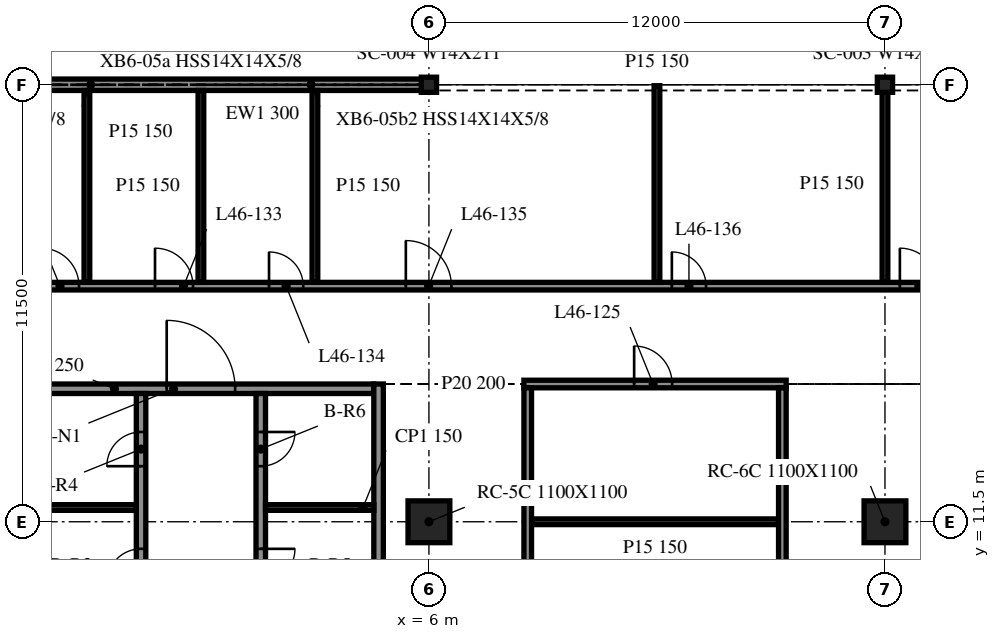
"""IFC4 building model, lengths in metres.
Left out: names, types, materials, properties, quantities, classifications, styles, units other than length and angle.
Written with IfcOpenShell. Run it as: python <this file> out.ifc"""

import sys

from ifc_helpers import new_model, si_unit, direction, frame, frame_2d, origin, origin_2d, place, context, subcontext, project, spatial, rectangle, i_section, extrude, element, fill, save


model = new_model("IFC4")
c1 = context("Model", 3, precision=1e-05, world=origin(), true_north=direction((0.0, 1.0)))
c2 = subcontext(c1, "Body", "Model", "MODEL_VIEW")
j1 = project(units=[si_unit("LENGTHUNIT", "METRE"), si_unit("PLANEANGLEUNIT", "RADIAN")], contexts=[c1])
p1 = place(None, origin())
s1 = spatial("IfcSite", under=j1, at=p1, CompositionType="ELEMENT")
p2 = place(p1, origin())
s2 = spatial("IfcBuilding", under=s1, at=p2, CompositionType="ELEMENT")
p3 = place(p2, frame((0.0, 0.0, 193.9)))
s3 = spatial("IfcBuildingStorey", under=s2, at=p3, CompositionType="ELEMENT", Elevation=193.9)
for number, where, z_axis, x_axis in (
    (1, (6.0, 11.5, -0.34), (0.0, 0.0, 1.0), (1.0, 0.0, 0.0)),
    (2, (18.0, 11.5, -0.34), (0.0, 0.0, 1.0), (1.0, 0.0, 0.0)),
):
    element("IfcColumn", number, at=place(p3, frame(where, z_axis=z_axis, x_axis=x_axis)), inside=s3, PredefinedType="COLUMN", context=c2, shape_type="SweptSolid", body=[
        extrude(rectangle(XDim=1.1, YDim=1.1, at=origin_2d()), origin(), (0.0, 0.0, 1.0), 3.8),
    ])
for number, where, z_axis, x_axis in (
    (3, (18.0, 23.0, -0.34), (0.0, 0.0, 1.0), (1.0, 0.0, 0.0)),
    (4, (6.0, 23.0, -0.34), (0.0, 0.0, 1.0), (1.0, 0.0, 0.0)),
):
    element("IfcColumn", number, at=place(p3, frame(where, z_axis=z_axis, x_axis=x_axis)), inside=s3, PredefinedType="COLUMN", context=c2, shape_type="SweptSolid", body=[
        extrude(i_section(OverallWidth=0.401, OverallDepth=0.399, WebThickness=0.025, FlangeThickness=0.04, at=origin_2d()), origin(), (0.0, 0.0, 1.0), 3.8),
    ])
p4 = place(p3, frame((5.988, 23.0, 0.0), z_axis=(0.0, 0.0, 1.0), x_axis=(-1.0, 0.0, 0.0)))
e5 = element("IfcWall", 5, at=p4, inside=s3, PredefinedType="NOTDEFINED", context=c2, shape_type="SweptSolid", body=[
    extrude(rectangle(XDim=11.975, YDim=0.3, at=frame_2d((5.988, 0.0))), origin(), (0.0, 0.0, 1.0), 2.782),
])
p5 = place(p3, frame((4.675, -9.125, 0.0), z_axis=(0.0, 0.0, 1.0), x_axis=(0.0, 1.0, 0.0)))
e6 = element("IfcWall", 6, at=p5, inside=s3, PredefinedType="SOLIDWALL", context=c2, shape_type="SweptSolid", body=[
    extrude(rectangle(XDim=24.25, YDim=0.25, at=frame_2d((12.125, 0.0))), origin(), (0.0, 0.0, 1.0), 3.46),
])
p6 = place(p3, frame((-4.55, 15.0, 0.0), z_axis=(0.0, 0.0, 1.0), x_axis=(1.0, 0.0, 0.0)))
e7 = element("IfcWall", 7, at=p6, inside=s3, PredefinedType="SOLIDWALL", context=c2, shape_type="SweptSolid", body=[
    extrude(rectangle(XDim=9.1, YDim=0.25, at=frame_2d((4.55, 0.0))), origin(), (0.0, 0.0, 1.0), 3.46),
])
p7 = place(p6, frame((3.65, 0.0, 0.0)))
e8 = element("IfcOpeningElement", 8, at=p7, cuts=e7, PredefinedType="OPENING", context=c2, shape_type="SweptSolid", body=[
    extrude(rectangle(XDim=1.8, YDim=2.1, at=frame_2d((0.9, 1.05))), frame((0.0, 0.135, 0.0), z_axis=(0.0, -1.0, 0.0), x_axis=(1.0, 0.0, 0.0)), (0.0, 0.0, 1.0), 0.27),
])
p8 = place(p3, frame((-1.575, -8.875, 0.0), z_axis=(0.0, 0.0, 1.0), x_axis=(0.0, 1.0, 0.0)))
e9 = element("IfcWall", 9, at=p8, inside=s3, PredefinedType="SOLIDWALL", context=c2, shape_type="SweptSolid", body=[
    extrude(rectangle(XDim=23.75, YDim=0.25, at=frame_2d((11.875, 0.0))), origin(), (0.0, 0.0, 1.0), 3.46),
])
p9 = place(p8, frame((7.2, 0.0, 0.0)))
e10 = element("IfcOpeningElement", 10, at=p9, cuts=e9, PredefinedType="OPENING", context=c2, shape_type="SweptSolid", body=[
    extrude(rectangle(XDim=1.1, YDim=2.1, at=frame_2d((0.55, 1.05))), frame((0.0, 0.135, 0.0), z_axis=(0.0, -1.0, 0.0), x_axis=(1.0, 0.0, 0.0)), (0.0, 0.0, 1.0), 0.27),
])
p10 = place(p8, frame((9.95, 0.0, 0.0)))
e11 = element("IfcOpeningElement", 11, at=p10, cuts=e9, PredefinedType="OPENING", context=c2, shape_type="SweptSolid", body=[
    extrude(rectangle(XDim=1.1, YDim=2.1, at=frame_2d((0.55, 1.05))), frame((0.0, 0.135, 0.0), z_axis=(0.0, -1.0, 0.0), x_axis=(1.0, 0.0, 0.0)), (0.0, 0.0, 1.0), 0.27),
])
p11 = place(p8, frame((12.7, 0.0, 0.0)))
e12 = element("IfcOpeningElement", 12, at=p11, cuts=e9, PredefinedType="OPENING", context=c2, shape_type="SweptSolid", body=[
    extrude(rectangle(XDim=1.1, YDim=2.1, at=frame_2d((0.55, 1.05))), frame((0.0, 0.135, 0.0), z_axis=(0.0, -1.0, 0.0), x_axis=(1.0, 0.0, 0.0)), (0.0, 0.0, 1.0), 0.27),
])
p12 = place(p8, frame((15.45, 0.0, 0.0)))
e13 = element("IfcOpeningElement", 13, at=p12, cuts=e9, PredefinedType="OPENING", context=c2, shape_type="SweptSolid", body=[
    extrude(rectangle(XDim=1.1, YDim=2.1, at=frame_2d((0.55, 1.05))), frame((0.0, 0.135, 0.0), z_axis=(0.0, -1.0, 0.0), x_axis=(1.0, 0.0, 0.0)), (0.0, 0.0, 1.0), 0.27),
])
p13 = place(p8, frame((1.252, 0.0, 0.0)))
e14 = element("IfcOpeningElement", 14, at=p13, cuts=e9, PredefinedType="OPENING", context=c2, shape_type="SweptSolid", body=[
    extrude(rectangle(XDim=0.9, YDim=2.1, at=frame_2d((0.45, 1.05))), frame((0.0, 0.135, 0.0), z_axis=(0.0, -1.0, 0.0), x_axis=(1.0, 0.0, 0.0)), (0.0, 0.0, 1.0), 0.27),
])
p14 = place(p8, frame((4.327, 0.0, 0.0)))
e15 = element("IfcOpeningElement", 15, at=p14, cuts=e9, PredefinedType="OPENING", context=c2, shape_type="SweptSolid", body=[
    extrude(rectangle(XDim=0.9, YDim=2.1, at=frame_2d((0.45, 1.05))), frame((0.0, 0.135, 0.0), z_axis=(0.0, -1.0, 0.0), x_axis=(1.0, 0.0, 0.0)), (0.0, 0.0, 1.0), 0.27),
])
p15 = place(p8, frame((18.762, 0.0, 0.0)))
e16 = element("IfcOpeningElement", 16, at=p15, cuts=e9, PredefinedType="OPENING", context=c2, shape_type="SweptSolid", body=[
    extrude(rectangle(XDim=0.9, YDim=2.1, at=frame_2d((0.45, 1.05))), frame((0.0, 0.135, 0.0), z_axis=(0.0, -1.0, 0.0), x_axis=(1.0, 0.0, 0.0)), (0.0, 0.0, 1.0), 0.27),
])
p16 = place(p8, frame((21.837, 0.0, 0.0)))
e17 = element("IfcOpeningElement", 17, at=p16, cuts=e9, PredefinedType="OPENING", context=c2, shape_type="SweptSolid", body=[
    extrude(rectangle(XDim=0.9, YDim=2.1, at=frame_2d((0.45, 1.05))), frame((0.0, 0.135, 0.0), z_axis=(0.0, -1.0, 0.0), x_axis=(1.0, 0.0, 0.0)), (0.0, 0.0, 1.0), 0.27),
])
p17 = place(p3, frame((1.575, 14.875, 0.0), z_axis=(0.0, 0.0, 1.0), x_axis=(0.0, -1.0, 0.0)))
e18 = element("IfcWall", 18, at=p17, inside=s3, PredefinedType="SOLIDWALL", context=c2, shape_type="SweptSolid", body=[
    extrude(rectangle(XDim=17.5, YDim=0.25, at=frame_2d((8.75, 0.0))), origin(), (0.0, 0.0, 1.0), 3.46),
])
p18 = place(p17, frame((15.45, 0.0, 0.0)))
e19 = element("IfcOpeningElement", 19, at=p18, cuts=e18, PredefinedType="OPENING", context=c2, shape_type="SweptSolid", body=[
    extrude(rectangle(XDim=1.1, YDim=2.1, at=frame_2d((0.55, 1.05))), frame((0.0, 0.135, 0.0), z_axis=(0.0, -1.0, 0.0), x_axis=(1.0, 0.0, 0.0)), (0.0, 0.0, 1.0), 0.27),
])
p19 = place(p17, frame((12.7, 0.0, 0.0)))
e20 = element("IfcOpeningElement", 20, at=p19, cuts=e18, PredefinedType="OPENING", context=c2, shape_type="SweptSolid", body=[
    extrude(rectangle(XDim=1.1, YDim=2.1, at=frame_2d((0.55, 1.05))), frame((0.0, 0.135, 0.0), z_axis=(0.0, -1.0, 0.0), x_axis=(1.0, 0.0, 0.0)), (0.0, 0.0, 1.0), 0.27),
])
p20 = place(p17, frame((9.95, 0.0, 0.0)))
e21 = element("IfcOpeningElement", 21, at=p20, cuts=e18, PredefinedType="OPENING", context=c2, shape_type="SweptSolid", body=[
    extrude(rectangle(XDim=1.1, YDim=2.1, at=frame_2d((0.55, 1.05))), frame((0.0, 0.135, 0.0), z_axis=(0.0, -1.0, 0.0), x_axis=(1.0, 0.0, 0.0)), (0.0, 0.0, 1.0), 0.27),
])
p21 = place(p17, frame((7.2, 0.0, 0.0)))
e22 = element("IfcOpeningElement", 22, at=p21, cuts=e18, PredefinedType="OPENING", context=c2, shape_type="SweptSolid", body=[
    extrude(rectangle(XDim=1.1, YDim=2.1, at=frame_2d((0.55, 1.05))), frame((0.0, 0.135, 0.0), z_axis=(0.0, -1.0, 0.0), x_axis=(1.0, 0.0, 0.0)), (0.0, 0.0, 1.0), 0.27),
])
p22 = place(p17, frame((4.087, 0.0, 0.0)))
e23 = element("IfcOpeningElement", 23, at=p22, cuts=e18, PredefinedType="OPENING", context=c2, shape_type="SweptSolid", body=[
    extrude(rectangle(XDim=0.9, YDim=2.1, at=frame_2d((0.45, 1.05))), frame((0.0, 0.135, 0.0), z_axis=(0.0, -1.0, 0.0), x_axis=(1.0, 0.0, 0.0)), (0.0, 0.0, 1.0), 0.27),
])
p23 = place(p17, frame((1.012, 0.0, 0.0)))
e24 = element("IfcOpeningElement", 24, at=p23, cuts=e18, PredefinedType="OPENING", context=c2, shape_type="SweptSolid", body=[
    extrude(rectangle(XDim=0.9, YDim=2.1, at=frame_2d((0.45, 1.05))), frame((0.0, 0.135, 0.0), z_axis=(0.0, -1.0, 0.0), x_axis=(1.0, 0.0, 0.0)), (0.0, 0.0, 1.0), 0.27),
])
for number, where, z_axis, x_axis in (
    (25, (-4.55, 11.875, 0.0), (0.0, 0.0, 1.0), (1.0, 0.0, 0.0)),
    (26, (1.7, 11.875, 0.0), (0.0, 0.0, 1.0), (1.0, 0.0, 0.0)),
):
    element("IfcWall", number, at=place(p3, frame(where, z_axis=z_axis, x_axis=x_axis)), inside=s3, PredefinedType="PARTITIONING", context=c2, shape_type="SweptSolid", body=[
        extrude(rectangle(XDim=2.85, YDim=0.15, at=frame_2d((1.425, 0.0))), origin(), (0.0, 0.0, 1.0), 3.46),
    ])
p24 = place(p3, frame((8.7, 11.5, 0.0), z_axis=(0.0, 0.0, 1.0), x_axis=(1.0, 0.0, 0.0)))
e27 = element("IfcWall", 27, at=p24, inside=s3, PredefinedType="PARTITIONING", context=c2, shape_type="SweptSolid", body=[
    extrude(rectangle(XDim=6.5, YDim=0.15, at=frame_2d((3.25, 0.0))), origin(), (0.0, 0.0, 1.0), 3.46),
])
p25 = place(p3, frame((8.5, 15.125, 0.0), z_axis=(0.0, 0.0, 1.0), x_axis=(1.0, 0.0, 0.0)))
e28 = element("IfcWall", 28, at=p25, inside=s3, PredefinedType="PARTITIONING", context=c2, shape_type="SweptSolid", body=[
    extrude(rectangle(XDim=6.9, YDim=0.2, at=frame_2d((3.45, 0.0))), origin(), (0.0, 0.0, 1.0), 3.46),
])
p26 = place(p25, frame((2.9, 0.0, 0.0)))
e29 = element("IfcOpeningElement", 29, at=p26, cuts=e28, PredefinedType="OPENING", context=c2, shape_type="SweptSolid", body=[
    extrude(rectangle(XDim=1.0, YDim=2.1, at=frame_2d((0.5, 1.05))), frame((0.0, 0.11, 0.0), z_axis=(0.0, -1.0, 0.0), x_axis=(1.0, 0.0, 0.0)), (0.0, 0.0, 1.0), 0.22),
])
p27 = place(p3, frame((-41.708, 17.7, 0.0), z_axis=(0.0, 0.0, 1.0), x_axis=(1.0, 0.0, 0.0)))
e30 = element("IfcWall", 30, at=p27, inside=s3, PredefinedType="PARTITIONING", context=c2, shape_type="SweptSolid", body=[
    extrude(rectangle(XDim=95.416, YDim=0.2, at=frame_2d((47.708, 0.0))), origin(), (0.0, 0.0, 1.0), 3.46),
])
p28 = place(p27, frame((7.5, 0.0, 0.0)))
e31 = element("IfcOpeningElement", 31, at=p28, cuts=e30, PredefinedType="OPENING", context=c2, shape_type="SweptSolid", body=[
    extrude(rectangle(XDim=1.0, YDim=2.1, at=frame_2d((0.5, 1.05))), frame((0.0, 0.11, 0.0), z_axis=(0.0, -1.0, 0.0), x_axis=(1.0, 0.0, 0.0)), (0.0, 0.0, 1.0), 0.22),
])
p29 = place(p27, frame((10.5, 0.0, 0.0)))
e32 = element("IfcOpeningElement", 32, at=p29, cuts=e30, PredefinedType="OPENING", context=c2, shape_type="SweptSolid", body=[
    extrude(rectangle(XDim=1.0, YDim=2.1, at=frame_2d((0.5, 1.05))), frame((0.0, 0.11, 0.0), z_axis=(0.0, -1.0, 0.0), x_axis=(1.0, 0.0, 0.0)), (0.0, 0.0, 1.0), 0.22),
])
p30 = place(p27, frame((13.5, 0.0, 0.0)))
e33 = element("IfcOpeningElement", 33, at=p30, cuts=e30, PredefinedType="OPENING", context=c2, shape_type="SweptSolid", body=[
    extrude(rectangle(XDim=0.9, YDim=2.1, at=frame_2d((0.45, 1.05))), frame((0.0, 0.11, 0.0), z_axis=(0.0, -1.0, 0.0), x_axis=(1.0, 0.0, 0.0)), (0.0, 0.0, 1.0), 0.22),
])
p31 = place(p27, frame((22.3, 0.0, 0.0)))
e34 = element("IfcOpeningElement", 34, at=p31, cuts=e30, PredefinedType="OPENING", context=c2, shape_type="SweptSolid", body=[
    extrude(rectangle(XDim=1.2, YDim=2.1, at=frame_2d((0.6, 1.05))), frame((0.0, 0.11, 0.0), z_axis=(0.0, -1.0, 0.0), x_axis=(1.0, 0.0, 0.0)), (0.0, 0.0, 1.0), 0.22),
])
p32 = place(p27, frame((28.5, 0.0, 0.0)))
e35 = element("IfcOpeningElement", 35, at=p32, cuts=e30, PredefinedType="OPENING", context=c2, shape_type="SweptSolid", body=[
    extrude(rectangle(XDim=0.9, YDim=2.1, at=frame_2d((0.45, 1.05))), frame((0.0, 0.11, 0.0), z_axis=(0.0, -1.0, 0.0), x_axis=(1.0, 0.0, 0.0)), (0.0, 0.0, 1.0), 0.22),
])
p33 = place(p27, frame((37.5, 0.0, 0.0)))
e36 = element("IfcOpeningElement", 36, at=p33, cuts=e30, PredefinedType="OPENING", context=c2, shape_type="SweptSolid", body=[
    extrude(rectangle(XDim=1.0, YDim=2.1, at=frame_2d((0.5, 1.05))), frame((0.0, 0.11, 0.0), z_axis=(0.0, -1.0, 0.0), x_axis=(1.0, 0.0, 0.0)), (0.0, 0.0, 1.0), 0.22),
])
p34 = place(p27, frame((40.5, 0.0, 0.0)))
e37 = element("IfcOpeningElement", 37, at=p34, cuts=e30, PredefinedType="OPENING", context=c2, shape_type="SweptSolid", body=[
    extrude(rectangle(XDim=1.0, YDim=2.1, at=frame_2d((0.5, 1.05))), frame((0.0, 0.11, 0.0), z_axis=(0.0, -1.0, 0.0), x_axis=(1.0, 0.0, 0.0)), (0.0, 0.0, 1.0), 0.22),
])
p35 = place(p27, frame((43.5, 0.0, 0.0)))
e38 = element("IfcOpeningElement", 38, at=p35, cuts=e30, PredefinedType="OPENING", context=c2, shape_type="SweptSolid", body=[
    extrude(rectangle(XDim=0.9, YDim=2.1, at=frame_2d((0.45, 1.05))), frame((0.0, 0.11, 0.0), z_axis=(0.0, -1.0, 0.0), x_axis=(1.0, 0.0, 0.0)), (0.0, 0.0, 1.0), 0.22),
])
p36 = place(p27, frame((47.1, 0.0, 0.0)))
e39 = element("IfcOpeningElement", 39, at=p36, cuts=e30, PredefinedType="OPENING", context=c2, shape_type="SweptSolid", body=[
    extrude(rectangle(XDim=1.2, YDim=2.1, at=frame_2d((0.6, 1.05))), frame((0.0, 0.11, 0.0), z_axis=(0.0, -1.0, 0.0), x_axis=(1.0, 0.0, 0.0)), (0.0, 0.0, 1.0), 0.22),
])
p37 = place(p27, frame((54.1, 0.0, 0.0)))
e40 = element("IfcOpeningElement", 40, at=p37, cuts=e30, PredefinedType="OPENING", context=c2, shape_type="SweptSolid", body=[
    extrude(rectangle(XDim=0.9, YDim=2.1, at=frame_2d((0.45, 1.05))), frame((0.0, 0.11, 0.0), z_axis=(0.0, -1.0, 0.0), x_axis=(1.0, 0.0, 0.0)), (0.0, 0.0, 1.0), 0.22),
])
p38 = place(p27, frame((60.1, 0.0, 0.0)))
e41 = element("IfcOpeningElement", 41, at=p38, cuts=e30, PredefinedType="OPENING", context=c2, shape_type="SweptSolid", body=[
    extrude(rectangle(XDim=1.0, YDim=2.1, at=frame_2d((0.5, 1.05))), frame((0.0, 0.11, 0.0), z_axis=(0.0, -1.0, 0.0), x_axis=(1.0, 0.0, 0.0)), (0.0, 0.0, 1.0), 0.22),
])
p39 = place(p27, frame((69.1, 0.0, 0.0)))
e42 = element("IfcOpeningElement", 42, at=p39, cuts=e30, PredefinedType="OPENING", context=c2, shape_type="SweptSolid", body=[
    extrude(rectangle(XDim=1.0, YDim=2.1, at=frame_2d((0.5, 1.05))), frame((0.0, 0.11, 0.0), z_axis=(0.0, -1.0, 0.0), x_axis=(1.0, 0.0, 0.0)), (0.0, 0.0, 1.0), 0.22),
])
p40 = place(p27, frame((72.1, 0.0, 0.0)))
e43 = element("IfcOpeningElement", 43, at=p40, cuts=e30, PredefinedType="OPENING", context=c2, shape_type="SweptSolid", body=[
    extrude(rectangle(XDim=0.9, YDim=2.1, at=frame_2d((0.45, 1.05))), frame((0.0, 0.11, 0.0), z_axis=(0.0, -1.0, 0.0), x_axis=(1.0, 0.0, 0.0)), (0.0, 0.0, 1.0), 0.22),
])
p41 = place(p27, frame((75.1, 0.0, 0.0)))
e44 = element("IfcOpeningElement", 44, at=p41, cuts=e30, PredefinedType="OPENING", context=c2, shape_type="SweptSolid", body=[
    extrude(rectangle(XDim=1.2, YDim=2.1, at=frame_2d((0.6, 1.05))), frame((0.0, 0.11, 0.0), z_axis=(0.0, -1.0, 0.0), x_axis=(1.0, 0.0, 0.0)), (0.0, 0.0, 1.0), 0.22),
])
p42 = place(p27, frame((84.1, 0.0, 0.0)))
e45 = element("IfcOpeningElement", 45, at=p42, cuts=e30, PredefinedType="OPENING", context=c2, shape_type="SweptSolid", body=[
    extrude(rectangle(XDim=0.9, YDim=2.1, at=frame_2d((0.45, 1.05))), frame((0.0, 0.11, 0.0), z_axis=(0.0, -1.0, 0.0), x_axis=(1.0, 0.0, 0.0)), (0.0, 0.0, 1.0), 0.22),
])
p43 = place(p27, frame((90.1, 0.0, 0.0)))
e46 = element("IfcOpeningElement", 46, at=p43, cuts=e30, PredefinedType="OPENING", context=c2, shape_type="SweptSolid", body=[
    extrude(rectangle(XDim=1.0, YDim=2.1, at=frame_2d((0.5, 1.05))), frame((0.0, 0.11, 0.0), z_axis=(0.0, -1.0, 0.0), x_axis=(1.0, 0.0, 0.0)), (0.0, 0.0, 1.0), 0.22),
])
for number, where, z_axis, x_axis in (
    (47, (-3.0, 17.8, 0.0), (0.0, 0.0, 1.0), (0.0, 1.0, 0.0)),
    (48, (0.0, 17.8, 0.0), (0.0, 0.0, 1.0), (0.0, 1.0, 0.0)),
    (49, (3.0, 17.8, 0.0), (0.0, 0.0, 1.0), (0.0, 1.0, 0.0)),
):
    element("IfcWall", number, at=place(p3, frame(where, z_axis=z_axis, x_axis=x_axis)), inside=s3, PredefinedType="PARTITIONING", context=c2, shape_type="SweptSolid", body=[
        extrude(rectangle(XDim=5.05, YDim=0.15, at=frame_2d((2.525, 0.0))), origin(), (0.0, 0.0, 1.0), 3.46),
    ])
p44 = place(p3, frame((8.6, -9.025, 0.0), z_axis=(0.0, 0.0, 1.0), x_axis=(0.0, 1.0, 0.0)))
e50 = element("IfcWall", 50, at=p44, inside=s3, PredefinedType="PARTITIONING", context=c2, shape_type="SweptSolid", body=[
    extrude(rectangle(XDim=24.05, YDim=0.2, at=frame_2d((12.025, 0.0))), origin(), (0.0, 0.0, 1.0), 3.46),
])
p45 = place(p44, frame((12.3, 0.0, 0.0)))
e51 = element("IfcOpeningElement", 51, at=p45, cuts=e50, PredefinedType="OPENING", context=c2, shape_type="SweptSolid", body=[
    extrude(rectangle(XDim=0.9, YDim=2.1, at=frame_2d((0.45, 1.05))), frame((0.0, 0.11, 0.0), z_axis=(0.0, -1.0, 0.0), x_axis=(1.0, 0.0, 0.0)), (0.0, 0.0, 1.0), 0.22),
])
p46 = place(p3, frame((12.0, 17.8, 0.0), z_axis=(0.0, 0.0, 1.0), x_axis=(0.0, 1.0, 0.0)))
e52 = element("IfcWall", 52, at=p46, inside=s3, PredefinedType="PARTITIONING", context=c2, shape_type="SweptSolid", body=[
    extrude(rectangle(XDim=5.175, YDim=0.15, at=frame_2d((2.587, 0.0))), origin(), (0.0, 0.0, 1.0), 3.46),
])
p47 = place(p3, frame((15.3, -9.025, 0.0), z_axis=(0.0, 0.0, 1.0), x_axis=(0.0, 1.0, 0.0)))
e53 = element("IfcWall", 53, at=p47, inside=s3, PredefinedType="PARTITIONING", context=c2, shape_type="SweptSolid", body=[
    extrude(rectangle(XDim=24.05, YDim=0.2, at=frame_2d((12.025, 0.0))), origin(), (0.0, 0.0, 1.0), 3.46),
])
p48 = place(p3, frame((18.0, 17.8, 0.0), z_axis=(0.0, 0.0, 1.0), x_axis=(0.0, 1.0, 0.0)))
e54 = element("IfcWall", 54, at=p48, inside=s3, PredefinedType="PARTITIONING", context=c2, shape_type="SweptSolid", body=[
    extrude(rectangle(XDim=5.175, YDim=0.15, at=frame_2d((2.587, 0.0))), origin(), (0.0, 0.0, 1.0), 3.46),
])
p49 = place(p7, origin())
e55 = element("IfcDoor", 55, at=p49, inside=s3, OperationType="DOUBLE_DOOR_SINGLE_SWING", PredefinedType="DOOR", context=c2, shape_type="SweptSolid", body=[
    extrude(rectangle(XDim=1.8, YDim=2.1, at=frame_2d((0.9, 1.05))), frame((0.0, 0.025, 0.0), z_axis=(0.0, -1.0, 0.0), x_axis=(1.0, 0.0, 0.0)), (0.0, 0.0, 1.0), 0.05),
])
fill(e8, e55)
p50 = place(p15, origin())
e56 = element("IfcDoor", 56, at=p50, inside=s3, OperationType="SINGLE_SWING_LEFT", PredefinedType="DOOR", context=c2, shape_type="SweptSolid", body=[
    extrude(rectangle(XDim=0.9, YDim=2.1, at=frame_2d((0.45, 1.05))), frame((0.0, 0.025, 0.0), z_axis=(0.0, -1.0, 0.0), x_axis=(1.0, 0.0, 0.0)), (0.0, 0.0, 1.0), 0.05),
])
fill(e16, e56)
p51 = place(p16, origin())
e57 = element("IfcDoor", 57, at=p51, inside=s3, OperationType="SINGLE_SWING_RIGHT", PredefinedType="DOOR", context=c2, shape_type="SweptSolid", body=[
    extrude(rectangle(XDim=0.9, YDim=2.1, at=frame_2d((0.45, 1.05))), frame((0.0, 0.025, 0.0), z_axis=(0.0, -1.0, 0.0), x_axis=(1.0, 0.0, 0.0)), (0.0, 0.0, 1.0), 0.05),
])
fill(e17, e57)
p52 = place(p22, origin())
e58 = element("IfcDoor", 58, at=p52, inside=s3, OperationType="SINGLE_SWING_LEFT", PredefinedType="DOOR", context=c2, shape_type="SweptSolid", body=[
    extrude(rectangle(XDim=0.9, YDim=2.1, at=frame_2d((0.45, 1.05))), frame((0.0, 0.025, 0.0), z_axis=(0.0, -1.0, 0.0), x_axis=(1.0, 0.0, 0.0)), (0.0, 0.0, 1.0), 0.05),
])
fill(e23, e58)
p53 = place(p23, origin())
e59 = element("IfcDoor", 59, at=p53, inside=s3, OperationType="SINGLE_SWING_RIGHT", PredefinedType="DOOR", context=c2, shape_type="SweptSolid", body=[
    extrude(rectangle(XDim=0.9, YDim=2.1, at=frame_2d((0.45, 1.05))), frame((0.0, 0.025, 0.0), z_axis=(0.0, -1.0, 0.0), x_axis=(1.0, 0.0, 0.0)), (0.0, 0.0, 1.0), 0.05),
])
fill(e24, e59)
p54 = place(p26, origin())
e60 = element("IfcDoor", 60, at=p54, inside=s3, OperationType="SINGLE_SWING_RIGHT", PredefinedType="DOOR", context=c2, shape_type="SweptSolid", body=[
    extrude(rectangle(XDim=1.0, YDim=2.1, at=frame_2d((0.5, 1.05))), frame((0.0, 0.025, 0.0), z_axis=(0.0, -1.0, 0.0), x_axis=(1.0, 0.0, 0.0)), (0.0, 0.0, 1.0), 0.05),
])
fill(e29, e60)
p55 = place(p33, origin())
e61 = element("IfcDoor", 61, at=p55, inside=s3, OperationType="SINGLE_SWING_LEFT", PredefinedType="DOOR", context=c2, shape_type="SweptSolid", body=[
    extrude(rectangle(XDim=1.0, YDim=2.1, at=frame_2d((0.5, 1.05))), frame((0.0, 0.025, 0.0), z_axis=(0.0, -1.0, 0.0), x_axis=(1.0, 0.0, 0.0)), (0.0, 0.0, 1.0), 0.05),
])
fill(e36, e61)
p56 = place(p34, origin())
e62 = element("IfcDoor", 62, at=p56, inside=s3, OperationType="SINGLE_SWING_LEFT", PredefinedType="DOOR", context=c2, shape_type="SweptSolid", body=[
    extrude(rectangle(XDim=1.0, YDim=2.1, at=frame_2d((0.5, 1.05))), frame((0.0, 0.025, 0.0), z_axis=(0.0, -1.0, 0.0), x_axis=(1.0, 0.0, 0.0)), (0.0, 0.0, 1.0), 0.05),
])
fill(e37, e62)
p57 = place(p35, origin())
e63 = element("IfcDoor", 63, at=p57, inside=s3, OperationType="SINGLE_SWING_LEFT", PredefinedType="DOOR", context=c2, shape_type="SweptSolid", body=[
    extrude(rectangle(XDim=0.9, YDim=2.1, at=frame_2d((0.45, 1.05))), frame((0.0, 0.025, 0.0), z_axis=(0.0, -1.0, 0.0), x_axis=(1.0, 0.0, 0.0)), (0.0, 0.0, 1.0), 0.05),
])
fill(e38, e63)
p58 = place(p36, origin())
e64 = element("IfcDoor", 64, at=p58, inside=s3, OperationType="SINGLE_SWING_LEFT", PredefinedType="DOOR", context=c2, shape_type="SweptSolid", body=[
    extrude(rectangle(XDim=1.2, YDim=2.1, at=frame_2d((0.6, 1.05))), frame((0.0, 0.025, 0.0), z_axis=(0.0, -1.0, 0.0), x_axis=(1.0, 0.0, 0.0)), (0.0, 0.0, 1.0), 0.05),
])
fill(e39, e64)
p59 = place(p37, origin())
e65 = element("IfcDoor", 65, at=p59, inside=s3, OperationType="SINGLE_SWING_RIGHT", PredefinedType="DOOR", context=c2, shape_type="SweptSolid", body=[
    extrude(rectangle(XDim=0.9, YDim=2.1, at=frame_2d((0.45, 1.05))), frame((0.0, 0.025, 0.0), z_axis=(0.0, -1.0, 0.0), x_axis=(1.0, 0.0, 0.0)), (0.0, 0.0, 1.0), 0.05),
])
fill(e40, e65)
p60 = place(p38, origin())
e66 = element("IfcDoor", 66, at=p60, inside=s3, OperationType="SINGLE_SWING_RIGHT", PredefinedType="DOOR", context=c2, shape_type="SweptSolid", body=[
    extrude(rectangle(XDim=1.0, YDim=2.1, at=frame_2d((0.5, 1.05))), frame((0.0, 0.025, 0.0), z_axis=(0.0, -1.0, 0.0), x_axis=(1.0, 0.0, 0.0)), (0.0, 0.0, 1.0), 0.05),
])
fill(e41, e66)
save(model, sys.argv[1])
